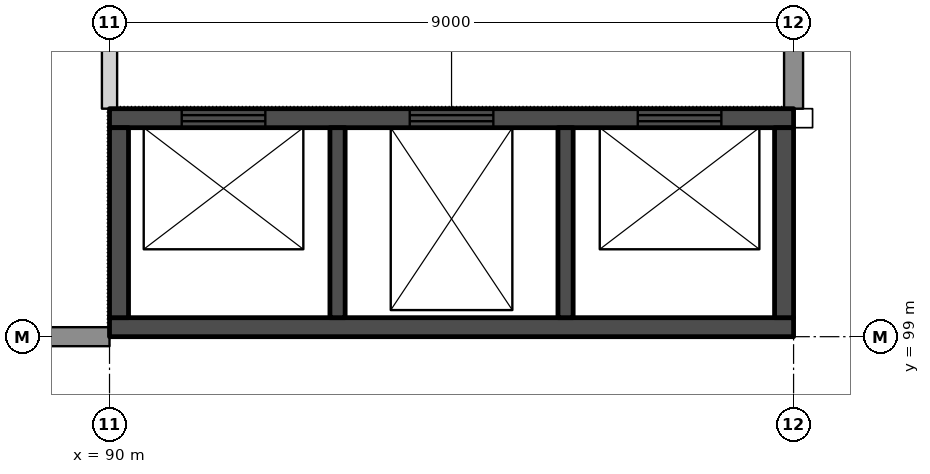
"""IFC4 building model, lengths in metres.
Left out: names, types, materials, properties, quantities, classifications, styles, units other than length and angle.
Written with IfcOpenShell. Run it as: python <this file> out.ifc"""

import sys

from ifc_helpers import new_model, si_unit, direction, frame, frame_2d, origin, place, context, subcontext, project, spatial, rectangle, extrude, element, fill, save


model = new_model("IFC4")
c1 = context("Model", 3, precision=1e-05, world=origin(), true_north=direction((0.0, 1.0)))
c2 = subcontext(c1, "Body", "Model", "MODEL_VIEW")
j1 = project(units=[si_unit("LENGTHUNIT", "METRE"), si_unit("PLANEANGLEUNIT", "RADIAN")], contexts=[c1])
p1 = place(None, origin())
s1 = spatial("IfcSite", under=j1, at=p1, CompositionType="ELEMENT")
p2 = place(p1, origin())
s2 = spatial("IfcBuilding", under=s1, at=p2, CompositionType="ELEMENT")
p3 = place(p2, frame((0.0, 0.0, 33.5)))
s3 = spatial("IfcBuildingStorey", under=s2, at=p3, CompositionType="ELEMENT", Elevation=33.5)
p4 = place(p3, frame((90.0, 102.0, 0.0), z_axis=(0.0, 0.0, 1.0), x_axis=(0.0, 1.0, 0.0)))
e1 = element("IfcWall", 1, at=p4, inside=s3, PredefinedType="PARTITIONING", context=c2, shape_type="SweptSolid", body=[
    extrude(rectangle(XDim=5.65, YDim=0.2, at=frame_2d((2.825, 0.0))), origin(), (0.0, 0.0, 1.0), 4.0),
])
p5 = place(p3, frame((90.0, 101.875, 0.0), z_axis=(0.0, 0.0, 1.0), x_axis=(1.0, 0.0, 0.0)))
e2 = element("IfcWall", 2, at=p5, inside=s3, PredefinedType="SHEAR", context=c2, shape_type="SweptSolid", body=[
    extrude(rectangle(XDim=9.0, YDim=0.25, at=frame_2d((4.5, 0.0))), origin(), (0.0, 0.0, 1.0), 4.0),
])
p6 = place(p5, frame((0.95, 0.0, 0.0)))
e3 = element("IfcOpeningElement", 3, at=p6, cuts=e2, PredefinedType="OPENING", context=c2, shape_type="SweptSolid", body=[
    extrude(rectangle(XDim=1.1, YDim=2.1, at=frame_2d((0.55, 1.05))), frame((0.0, 0.135, 0.0), z_axis=(0.0, -1.0, 0.0), x_axis=(1.0, 0.0, 0.0)), (0.0, 0.0, 1.0), 0.27),
])
p7 = place(p5, frame((3.95, 0.0, 0.0)))
e4 = element("IfcOpeningElement", 4, at=p7, cuts=e2, PredefinedType="OPENING", context=c2, shape_type="SweptSolid", body=[
    extrude(rectangle(XDim=1.1, YDim=2.1, at=frame_2d((0.55, 1.05))), frame((0.0, 0.135, 0.0), z_axis=(0.0, -1.0, 0.0), x_axis=(1.0, 0.0, 0.0)), (0.0, 0.0, 1.0), 0.27),
])
p8 = place(p5, frame((6.95, 0.0, 0.0)))
e5 = element("IfcOpeningElement", 5, at=p8, cuts=e2, PredefinedType="OPENING", context=c2, shape_type="SweptSolid", body=[
    extrude(rectangle(XDim=1.1, YDim=2.1, at=frame_2d((0.55, 1.05))), frame((0.0, 0.135, 0.0), z_axis=(0.0, -1.0, 0.0), x_axis=(1.0, 0.0, 0.0)), (0.0, 0.0, 1.0), 0.27),
])
p9 = place(p3, frame((90.0, 99.125, 0.0), z_axis=(0.0, 0.0, 1.0), x_axis=(1.0, 0.0, 0.0)))
e6 = element("IfcWall", 6, at=p9, inside=s3, PredefinedType="SHEAR", context=c2, shape_type="SweptSolid", body=[
    extrude(rectangle(XDim=9.0, YDim=0.25, at=frame_2d((4.5, 0.0))), origin(), (0.0, 0.0, 1.0), 4.0),
])
for number, where, z_axis, x_axis in (
    (7, (90.125, 99.25, 0.0), (0.0, 0.0, 1.0), (0.0, 1.0, 0.0)),
    (8, (98.875, 99.25, 0.0), (0.0, 0.0, 1.0), (0.0, 1.0, 0.0)),
):
    element("IfcWall", number, at=place(p3, frame(where, z_axis=z_axis, x_axis=x_axis)), inside=s3, PredefinedType="SHEAR", context=c2, shape_type="SweptSolid", body=[
        extrude(rectangle(XDim=2.5, YDim=0.25, at=frame_2d((1.25, 0.0))), origin(), (0.0, 0.0, 1.0), 4.0),
    ])
for number, where, z_axis, x_axis in (
    (9, (93.0, 99.25, 0.0), (0.0, 0.0, 1.0), (0.0, 1.0, 0.0)),
    (10, (96.0, 99.25, 0.0), (0.0, 0.0, 1.0), (0.0, 1.0, 0.0)),
):
    element("IfcWall", number, at=place(p3, frame(where, z_axis=z_axis, x_axis=x_axis)), inside=s3, PredefinedType="SHEAR", context=c2, shape_type="SweptSolid", body=[
        extrude(rectangle(XDim=2.5, YDim=0.2, at=frame_2d((1.25, 0.0))), origin(), (0.0, 0.0, 1.0), 4.0),
    ])
p10 = place(p3, frame((99.0, 102.0, 0.0), z_axis=(0.0, 0.0, 1.0), x_axis=(0.0, 1.0, 0.0)))
e11 = element("IfcWall", 11, at=p10, inside=s3, PredefinedType="SOLIDWALL", context=c2, shape_type="SweptSolid", body=[
    extrude(rectangle(XDim=5.65, YDim=0.25, at=frame_2d((2.825, 0.0))), origin(), (0.0, 0.0, 1.0), 4.0),
])
p11 = place(p3, frame((81.0, 99.0, 0.0), z_axis=(0.0, 0.0, 1.0), x_axis=(1.0, 0.0, 0.0)))
e12 = element("IfcWall", 12, at=p11, inside=s3, PredefinedType="SOLIDWALL", context=c2, shape_type="SweptSolid", body=[
    extrude(rectangle(XDim=9.0, YDim=0.25, at=frame_2d((4.5, 0.0))), origin(), (0.0, 0.0, 1.0), 4.0),
])
p12 = place(p6, origin())
e13 = element("IfcDoor", 13, at=p12, inside=s3, OperationType="DOUBLE_DOOR_SLIDING", PredefinedType="DOOR", context=c2, shape_type="SweptSolid", body=[
    extrude(rectangle(XDim=1.1, YDim=2.1, at=frame_2d((0.55, 1.05))), frame((0.0, 0.025, 0.0), z_axis=(0.0, -1.0, 0.0), x_axis=(1.0, 0.0, 0.0)), (0.0, 0.0, 1.0), 0.05),
])
fill(e3, e13)
p13 = place(p7, origin())
e14 = element("IfcDoor", 14, at=p13, inside=s3, OperationType="DOUBLE_DOOR_SLIDING", PredefinedType="DOOR", context=c2, shape_type="SweptSolid", body=[
    extrude(rectangle(XDim=1.1, YDim=2.1, at=frame_2d((0.55, 1.05))), frame((0.0, 0.025, 0.0), z_axis=(0.0, -1.0, 0.0), x_axis=(1.0, 0.0, 0.0)), (0.0, 0.0, 1.0), 0.05),
])
fill(e4, e14)
p14 = place(p8, origin())
e15 = element("IfcDoor", 15, at=p14, inside=s3, OperationType="DOUBLE_DOOR_SLIDING", PredefinedType="DOOR", context=c2, shape_type="SweptSolid", body=[
    extrude(rectangle(XDim=1.1, YDim=2.1, at=frame_2d((0.55, 1.05))), frame((0.0, 0.025, 0.0), z_axis=(0.0, -1.0, 0.0), x_axis=(1.0, 0.0, 0.0)), (0.0, 0.0, 1.0), 0.05),
])
fill(e5, e15)
save(model, sys.argv[1])
